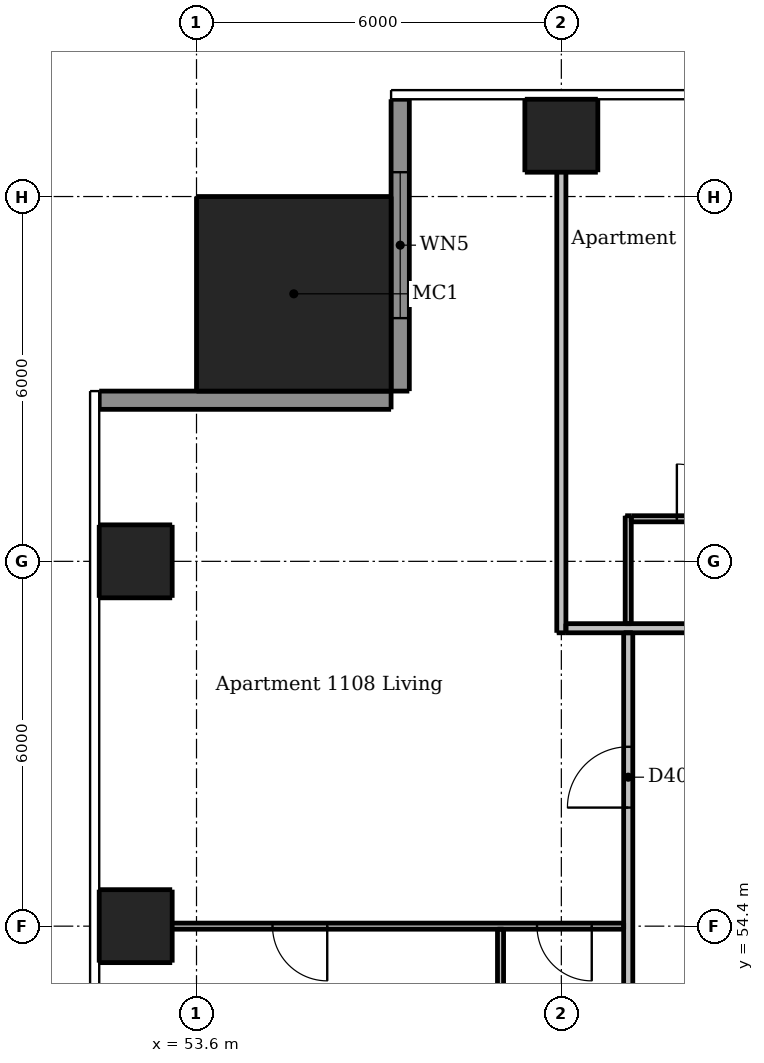
"""IFC4 building model, lengths in metres.
Left out: names, types, materials, properties, quantities, classifications, styles, units other than length and angle.
Written with IfcOpenShell. Run it as: python <this file> out.ifc"""

import sys

from ifc_helpers import new_model, si_unit, direction, frame, frame_2d, origin, origin_2d, place, context, subcontext, project, spatial, rectangle, extrude, element, fill, save


model = new_model("IFC4")
c1 = context("Model", 3, precision=1e-05, world=origin(), true_north=direction((0.0, 1.0)))
c2 = subcontext(c1, "Body", "Model", "MODEL_VIEW")
j1 = project(units=[si_unit("LENGTHUNIT", "METRE"), si_unit("PLANEANGLEUNIT", "RADIAN")], contexts=[c1])
p1 = place(None, origin())
s1 = spatial("IfcSite", under=j1, at=p1, CompositionType="ELEMENT")
p2 = place(p1, origin())
s2 = spatial("IfcBuilding", under=s1, at=p2, CompositionType="ELEMENT")
p3 = place(p2, frame((0.0, 0.0, 43.3)))
s3 = spatial("IfcBuildingStorey", under=s2, at=p3, CompositionType="ELEMENT", Elevation=43.3)
for number, where, z_axis, x_axis in (
    (1, (59.6, 67.4, 0.0), (0.0, 0.0, 1.0), (1.0, 0.0, 0.0)),
    (2, (52.6, 54.4, 0.0), (0.0, 0.0, 1.0), (1.0, 0.0, 0.0)),
    (3, (52.6, 60.4, 0.0), (0.0, 0.0, 1.0), (1.0, 0.0, 0.0)),
):
    element("IfcColumn", number, at=place(p3, frame(where, z_axis=z_axis, x_axis=x_axis)), inside=s3, PredefinedType="COLUMN", context=c2, shape_type="SweptSolid", body=[
        extrude(rectangle(XDim=1.2, YDim=1.2, at=origin_2d()), origin(), (0.0, 0.0, 1.0), 3.05),
    ])
p4 = place(p3, frame((55.2, 64.8, 0.0), z_axis=(0.0, 0.0, 1.0), x_axis=(1.0, 0.0, 0.0)))
e4 = element("IfcColumn", 4, at=p4, inside=s3, PredefinedType="COLUMN", context=c2, shape_type="SweptSolid", body=[
    extrude(rectangle(XDim=3.2, YDim=3.2, at=origin_2d()), origin(), (0.0, 0.0, 1.0), 3.3),
])
p5 = place(p3, frame((56.95, 68.0, 0.0), z_axis=(0.0, 0.0, 1.0), x_axis=(0.0, -1.0, 0.0)))
e5 = element("IfcWall", 5, at=p5, inside=s3, PredefinedType="SOLIDWALL", context=c2, shape_type="SweptSolid", body=[
    extrude(rectangle(XDim=4.8, YDim=0.3, at=frame_2d((2.4, 0.0))), origin(), (0.0, 0.0, 1.0), 3.05),
])
p6 = place(p5, frame((1.2, 0.0, 0.15)))
e6 = element("IfcOpeningElement", 6, at=p6, cuts=e5, PredefinedType="OPENING", context=c2, shape_type="SweptSolid", body=[
    extrude(rectangle(XDim=2.4, YDim=2.1, at=frame_2d((1.2, 1.05))), frame((0.0, 0.16, 0.0), z_axis=(0.0, -1.0, 0.0), x_axis=(1.0, 0.0, 0.0)), (0.0, 0.0, 1.0), 0.32),
])
p7 = place(p3, frame((56.8, 63.05, 0.0), z_axis=(0.0, 0.0, 1.0), x_axis=(-1.0, 0.0, 0.0)))
e7 = element("IfcWall", 7, at=p7, inside=s3, PredefinedType="SOLIDWALL", context=c2, shape_type="SweptSolid", body=[
    extrude(rectangle(XDim=4.8, YDim=0.3, at=frame_2d((2.4, 0.0))), origin(), (0.0, 0.0, 1.0), 3.05),
])
p8 = place(p3, frame((58.6, 54.35, 0.0), z_axis=(0.0, 0.0, 1.0), x_axis=(0.0, -1.0, 0.0)))
e8 = element("IfcWall", 8, at=p8, inside=s3, PredefinedType="PARTITIONING", context=c2, shape_type="SweptSolid", body=[
    extrude(rectangle(XDim=9.6, YDim=0.1, at=frame_2d((4.8, 0.0))), origin(), (0.0, 0.0, 1.0), 3.05),
])
p9 = place(p8, frame((7.35, 0.0, 0.0)))
e9 = element("IfcOpeningElement", 9, at=p9, cuts=e8, PredefinedType="OPENING", context=c2, shape_type="SweptSolid", body=[
    extrude(rectangle(XDim=0.8, YDim=2.1, at=frame_2d((0.4, 1.05))), frame((0.0, 0.06, 0.0), z_axis=(0.0, -1.0, 0.0), x_axis=(1.0, 0.0, 0.0)), (0.0, 0.0, 1.0), 0.12),
])
p10 = place(p8, frame((3.75, 0.0, 0.0)))
e10 = element("IfcOpeningElement", 10, at=p10, cuts=e8, PredefinedType="OPENING", context=c2, shape_type="SweptSolid", body=[
    extrude(rectangle(XDim=0.8, YDim=2.1, at=frame_2d((0.4, 1.05))), frame((0.0, 0.06, 0.0), z_axis=(0.0, -1.0, 0.0), x_axis=(1.0, 0.0, 0.0)), (0.0, 0.0, 1.0), 0.12),
])
p11 = place(p3, frame((60.7, 59.375, 0.0), z_axis=(0.0, 0.0, 1.0), x_axis=(0.0, 1.0, 0.0)))
e11 = element("IfcWall", 11, at=p11, inside=s3, PredefinedType="PARTITIONING", context=c2, shape_type="SweptSolid", body=[
    extrude(rectangle(XDim=1.775, YDim=0.1, at=frame_2d((0.887, 0.0))), origin(), (0.0, 0.0, 1.0), 3.05),
])
p12 = place(p3, frame((60.75, 61.1, 0.0), z_axis=(0.0, 0.0, 1.0), x_axis=(1.0, 0.0, 0.0)))
e12 = element("IfcWall", 12, at=p12, inside=s3, PredefinedType="PARTITIONING", context=c2, shape_type="SweptSolid", body=[
    extrude(rectangle(XDim=16.775, YDim=0.1, at=frame_2d((8.387, 0.0))), origin(), (0.0, 0.0, 1.0), 3.05),
])
p13 = place(p12, frame((11.3, 0.0, 0.0)))
e13 = element("IfcOpeningElement", 13, at=p13, cuts=e12, PredefinedType="OPENING", context=c2, shape_type="SweptSolid", body=[
    extrude(rectangle(XDim=0.9, YDim=2.1, at=frame_2d((0.45, 1.05))), frame((0.0, 0.06, 0.0), z_axis=(0.0, -1.0, 0.0), x_axis=(1.0, 0.0, 0.0)), (0.0, 0.0, 1.0), 0.12),
])
p14 = place(p12, frame((15.2, 0.0, 0.0)))
e14 = element("IfcOpeningElement", 14, at=p14, cuts=e12, PredefinedType="OPENING", context=c2, shape_type="SweptSolid", body=[
    extrude(rectangle(XDim=0.9, YDim=2.1, at=frame_2d((0.45, 1.05))), frame((0.0, 0.06, 0.0), z_axis=(0.0, -1.0, 0.0), x_axis=(1.0, 0.0, 0.0)), (0.0, 0.0, 1.0), 0.12),
])
p15 = place(p12, frame((13.1, 0.0, 0.0)))
e15 = element("IfcOpeningElement", 15, at=p15, cuts=e12, PredefinedType="OPENING", context=c2, shape_type="SweptSolid", body=[
    extrude(rectangle(XDim=0.9, YDim=2.1, at=frame_2d((0.45, 1.05))), frame((0.0, 0.06, 0.0), z_axis=(0.0, -1.0, 0.0), x_axis=(1.0, 0.0, 0.0)), (0.0, 0.0, 1.0), 0.12),
])
p16 = place(p12, frame((0.75, 0.0, 0.0)))
e16 = element("IfcOpeningElement", 16, at=p16, cuts=e12, PredefinedType="OPENING", context=c2, shape_type="SweptSolid", body=[
    extrude(rectangle(XDim=0.9, YDim=2.1, at=frame_2d((0.45, 1.05))), frame((0.0, 0.06, 0.0), z_axis=(0.0, -1.0, 0.0), x_axis=(1.0, 0.0, 0.0)), (0.0, 0.0, 1.0), 0.12),
])
p17 = place(p12, frame((6.2, 0.0, 0.0)))
e17 = element("IfcOpeningElement", 17, at=p17, cuts=e12, PredefinedType="OPENING", context=c2, shape_type="SweptSolid", body=[
    extrude(rectangle(XDim=0.9, YDim=2.1, at=frame_2d((0.45, 1.05))), frame((0.0, 0.06, 0.0), z_axis=(0.0, -1.0, 0.0), x_axis=(1.0, 0.0, 0.0)), (0.0, 0.0, 1.0), 0.12),
])
p18 = place(p12, frame((3.25, 0.0, 0.0)))
e18 = element("IfcOpeningElement", 18, at=p18, cuts=e12, PredefinedType="OPENING", context=c2, shape_type="SweptSolid", body=[
    extrude(rectangle(XDim=0.8, YDim=2.1, at=frame_2d((0.4, 1.05))), frame((0.0, 0.06, 0.0), z_axis=(0.0, -1.0, 0.0), x_axis=(1.0, 0.0, 0.0)), (0.0, 0.0, 1.0), 0.12),
])
p19 = place(p12, frame((9.25, 0.0, 0.0)))
e19 = element("IfcOpeningElement", 19, at=p19, cuts=e12, PredefinedType="OPENING", context=c2, shape_type="SweptSolid", body=[
    extrude(rectangle(XDim=0.8, YDim=2.1, at=frame_2d((0.4, 1.05))), frame((0.0, 0.06, 0.0), z_axis=(0.0, -1.0, 0.0), x_axis=(1.0, 0.0, 0.0)), (0.0, 0.0, 1.0), 0.12),
])
p20 = place(p3, frame((60.625, 54.4, 0.0), z_axis=(0.0, 0.0, 1.0), x_axis=(-1.0, 0.0, 0.0)))
e20 = element("IfcWall", 20, at=p20, inside=s3, PredefinedType="PARTITIONING", context=c2, shape_type="SweptSolid", body=[
    extrude(rectangle(XDim=8.625, YDim=0.1, at=frame_2d((4.312, 0.0))), origin(), (0.0, 0.0, 1.0), 2.516),
])
p21 = place(p20, frame((0.525, 0.0, 0.0)))
e21 = element("IfcOpeningElement", 21, at=p21, cuts=e20, PredefinedType="OPENING", context=c2, shape_type="SweptSolid", body=[
    extrude(rectangle(XDim=0.9, YDim=2.1, at=frame_2d((0.45, 1.05))), frame((0.0, 0.06, 0.0), z_axis=(0.0, -1.0, 0.0), x_axis=(1.0, 0.0, 0.0)), (0.0, 0.0, 1.0), 0.12),
])
p22 = place(p20, frame((4.875, 0.0, 0.0)))
e22 = element("IfcOpeningElement", 22, at=p22, cuts=e20, PredefinedType="OPENING", context=c2, shape_type="SweptSolid", body=[
    extrude(rectangle(XDim=0.9, YDim=2.1, at=frame_2d((0.45, 1.05))), frame((0.0, 0.06, 0.0), z_axis=(0.0, -1.0, 0.0), x_axis=(1.0, 0.0, 0.0)), (0.0, 0.0, 1.0), 0.12),
])
p23 = place(p3, frame((59.6, 59.225, 0.0), z_axis=(0.0, 0.0, 1.0), x_axis=(0.0, 1.0, 0.0)))
e23 = element("IfcWall", 23, at=p23, inside=s3, PredefinedType="PARTITIONING", context=c2, shape_type="SweptSolid", body=[
    extrude(rectangle(XDim=8.775, YDim=0.15, at=frame_2d((4.387, 0.0))), origin(), (0.0, 0.0, 1.0), 2.51),
])
p24 = place(p3, frame((60.7, 30.325, 0.0), z_axis=(0.0, 0.0, 1.0), x_axis=(0.0, 1.0, 0.0)))
e24 = element("IfcWall", 24, at=p24, inside=s3, PredefinedType="PARTITIONING", context=c2, shape_type="SweptSolid", body=[
    extrude(rectangle(XDim=28.9, YDim=0.15, at=frame_2d((14.45, 0.0))), origin(), (0.0, 0.0, 1.0), 3.05),
])
p25 = place(p24, frame((7.375, 0.0, 0.0)))
e25 = element("IfcOpeningElement", 25, at=p25, cuts=e24, PredefinedType="OPENING", context=c2, shape_type="SweptSolid", body=[
    extrude(rectangle(XDim=1.0, YDim=2.1, at=frame_2d((0.5, 1.05))), frame((0.0, 0.085, 0.0), z_axis=(0.0, -1.0, 0.0), x_axis=(1.0, 0.0, 0.0)), (0.0, 0.0, 1.0), 0.17),
])
p26 = place(p24, frame((26.025, 0.0, 0.0)))
e26 = element("IfcOpeningElement", 26, at=p26, cuts=e24, PredefinedType="OPENING", context=c2, shape_type="SweptSolid", body=[
    extrude(rectangle(XDim=1.0, YDim=2.1, at=frame_2d((0.5, 1.05))), frame((0.0, 0.085, 0.0), z_axis=(0.0, -1.0, 0.0), x_axis=(1.0, 0.0, 0.0)), (0.0, 0.0, 1.0), 0.17),
])
p27 = place(p3, frame((59.675, 59.3, 0.0), z_axis=(0.0, 0.0, 1.0), x_axis=(1.0, 0.0, 0.0)))
e27 = element("IfcWall", 27, at=p27, inside=s3, PredefinedType="PARTITIONING", context=c2, shape_type="SweptSolid", body=[
    extrude(rectangle(XDim=28.55, YDim=0.15, at=frame_2d((14.275, 0.0))), origin(), (0.0, 0.0, 1.0), 3.05),
])
p28 = place(p27, frame((8.975, 0.0, 0.0)))
e28 = element("IfcOpeningElement", 28, at=p28, cuts=e27, PredefinedType="OPENING", context=c2, shape_type="SweptSolid", body=[
    extrude(rectangle(XDim=1.0, YDim=2.1, at=frame_2d((0.5, 1.05))), frame((0.0, 0.085, 0.0), z_axis=(0.0, -1.0, 0.0), x_axis=(1.0, 0.0, 0.0)), (0.0, 0.0, 1.0), 0.17),
])
p29 = place(p27, frame((25.775, 0.0, 0.0)))
e29 = element("IfcOpeningElement", 29, at=p29, cuts=e27, PredefinedType="OPENING", context=c2, shape_type="SweptSolid", body=[
    extrude(rectangle(XDim=1.0, YDim=2.1, at=frame_2d((0.5, 1.05))), frame((0.0, 0.085, 0.0), z_axis=(0.0, -1.0, 0.0), x_axis=(1.0, 0.0, 0.0)), (0.0, 0.0, 1.0), 0.17),
])
p30 = place(p6, origin())
e30 = element("IfcWindow", 30, at=p30, inside=s3, PartitioningType="DOUBLE_PANEL_VERTICAL", PredefinedType="WINDOW", context=c2, shape_type="SweptSolid", body=[
    extrude(rectangle(XDim=2.4, YDim=2.1, at=frame_2d((1.2, 1.05))), frame((0.0, 0.03, 0.0), z_axis=(0.0, -1.0, 0.0), x_axis=(1.0, 0.0, 0.0)), (0.0, 0.0, 1.0), 0.06),
])
fill(e6, e30)
p31 = place(p16, origin())
e31 = element("IfcDoor", 31, at=p31, inside=s3, OperationType="SINGLE_SWING_LEFT", PredefinedType="DOOR", context=c2, shape_type="SweptSolid", body=[
    extrude(rectangle(XDim=0.9, YDim=2.1, at=frame_2d((0.45, 1.05))), frame((0.0, 0.025, 0.0), z_axis=(0.0, -1.0, 0.0), x_axis=(1.0, 0.0, 0.0)), (0.0, 0.0, 1.0), 0.05),
])
fill(e16, e31)
p32 = place(p26, origin())
e32 = element("IfcDoor", 32, at=p32, inside=s3, OperationType="SINGLE_SWING_LEFT", PredefinedType="DOOR", context=c2, shape_type="SweptSolid", body=[
    extrude(rectangle(XDim=1.0, YDim=2.1, at=frame_2d((0.5, 1.05))), frame((0.0, 0.025, 0.0), z_axis=(0.0, -1.0, 0.0), x_axis=(1.0, 0.0, 0.0)), (0.0, 0.0, 1.0), 0.05),
])
fill(e26, e32)
p33 = place(p21, origin())
e33 = element("IfcDoor", 33, at=p33, inside=s3, OperationType="SINGLE_SWING_LEFT", PredefinedType="DOOR", context=c2, shape_type="SweptSolid", body=[
    extrude(rectangle(XDim=0.9, YDim=2.1, at=frame_2d((0.45, 1.05))), frame((0.0, 0.025, 0.0), z_axis=(0.0, -1.0, 0.0), x_axis=(1.0, 0.0, 0.0)), (0.0, 0.0, 1.0), 0.05),
])
fill(e21, e33)
p34 = place(p22, origin())
e34 = element("IfcDoor", 34, at=p34, inside=s3, OperationType="SINGLE_SWING_LEFT", PredefinedType="DOOR", context=c2, shape_type="SweptSolid", body=[
    extrude(rectangle(XDim=0.9, YDim=2.1, at=frame_2d((0.45, 1.05))), frame((0.0, 0.025, 0.0), z_axis=(0.0, -1.0, 0.0), x_axis=(1.0, 0.0, 0.0)), (0.0, 0.0, 1.0), 0.05),
])
fill(e22, e34)
save(model, sys.argv[1])
